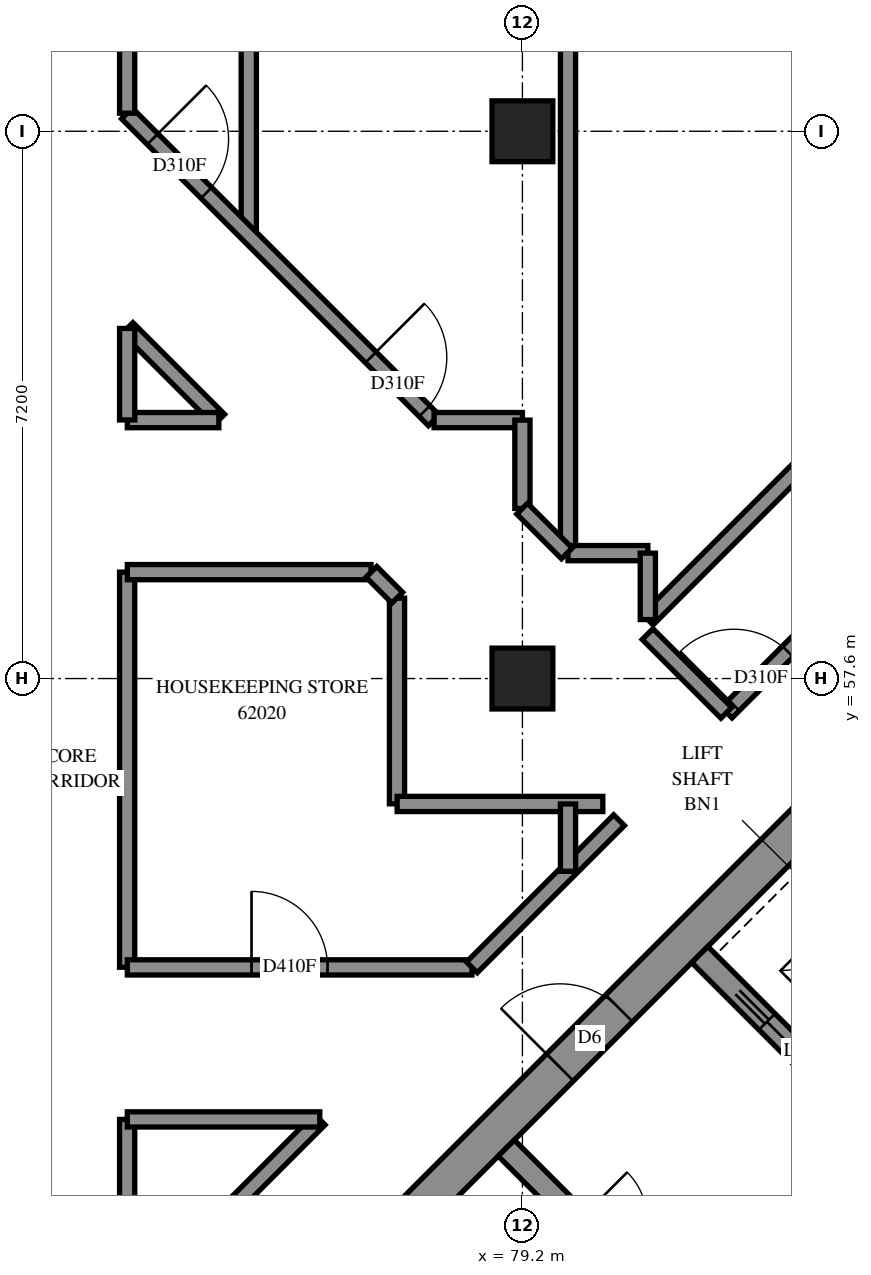
"""IFC4 building model, lengths in metres.
Left out: names, types, materials, properties, quantities, classifications, styles, units other than length and angle.
Written with IfcOpenShell. Run it as: python <this file> out.ifc"""

import sys

from ifc_helpers import new_model, si_unit, direction, frame, frame_2d, origin, origin_2d, place, context, subcontext, project, spatial, rectangle, extrude, element, fill, save


model = new_model("IFC4")
c1 = context("Model", 3, precision=1e-05, world=origin(), true_north=direction((0.0, 1.0)))
c2 = subcontext(c1, "Body", "Model", "MODEL_VIEW")
j1 = project(units=[si_unit("LENGTHUNIT", "METRE"), si_unit("PLANEANGLEUNIT", "RADIAN")], contexts=[c1])
p1 = place(None, origin())
s1 = spatial("IfcSite", under=j1, at=p1, CompositionType="ELEMENT")
p2 = place(p1, origin())
s2 = spatial("IfcBuilding", under=s1, at=p2, CompositionType="ELEMENT")
p3 = place(p2, frame((0.0, 0.0, 227.0)))
s3 = spatial("IfcBuildingStorey", under=s2, at=p3, CompositionType="ELEMENT", Elevation=227.0)
for number, where, z_axis, x_axis in (
    (1, (79.2, 57.6, 0.0), (0.0, 0.0, 1.0), (1.0, 0.0, 0.0)),
    (2, (79.2, 64.8, 0.0), (0.0, 0.0, 1.0), (1.0, 0.0, 0.0)),
):
    element("IfcColumn", number, at=place(p3, frame(where, z_axis=z_axis, x_axis=x_axis)), inside=s3, PredefinedType="COLUMN", context=c2, shape_type="SweptSolid", body=[
        extrude(rectangle(XDim=0.8, YDim=0.8, at=origin_2d()), origin(), (0.0, 0.0, 1.0), 3.1),
    ])
p4 = place(p3, frame((76.478, 49.267, -0.3), z_axis=(0.0, 0.0, 1.0), x_axis=(0.7071067812, 0.7071067812, 0.0)))
e3 = element("IfcWall", 3, at=p4, inside=s3, PredefinedType="SHEAR", context=c2, shape_type="SweptSolid", body=[
    extrude(rectangle(XDim=14.4, YDim=0.5, at=frame_2d((7.2, 0.0))), origin(), (0.0, 0.0, 1.0), 2.7),
])
p5 = place(p4, frame((4.55, 0.0, 0.3)))
e4 = element("IfcOpeningElement", 4, at=p5, cuts=e3, PredefinedType="OPENING", context=c2, shape_type="SweptSolid", body=[
    extrude(rectangle(XDim=1.1, YDim=2.1, at=frame_2d((0.55, 1.05))), frame((0.0, 0.26, 0.0), z_axis=(0.0, -1.0, 0.0), x_axis=(1.0, 0.0, 0.0)), (0.0, 0.0, 1.0), 0.52),
])
p6 = place(p4, frame((11.35, 0.0, 0.3)))
e5 = element("IfcOpeningElement", 5, at=p6, cuts=e3, PredefinedType="OPENING", context=c2, shape_type="SweptSolid", body=[
    extrude(rectangle(XDim=1.1, YDim=2.1, at=frame_2d((0.55, 1.05))), frame((0.0, 0.26, 0.0), z_axis=(0.0, -1.0, 0.0), x_axis=(1.0, 0.0, 0.0)), (0.0, 0.0, 1.0), 0.52),
])
p7 = place(p3, frame((78.988, 51.423, 0.0), z_axis=(0.0, 0.0, 1.0), x_axis=(0.7071067812, -0.7071067812, 0.0)))
e6 = element("IfcWall", 6, at=p7, inside=s3, PredefinedType="SOLIDWALL", context=c2, shape_type="SweptSolid", body=[
    extrude(rectangle(XDim=14.4, YDim=0.3, at=frame_2d((7.2, 0.0))), origin(), (0.0, 0.0, 1.0), 3.1),
])
p8 = place(p7, frame((1.35, 0.0, 0.0)))
e7 = element("IfcOpeningElement", 7, at=p8, cuts=e6, PredefinedType="OPENING", context=c2, shape_type="SweptSolid", body=[
    extrude(rectangle(XDim=0.9, YDim=2.1, at=frame_2d((0.45, 1.05))), frame((0.0, 0.16, 0.0), z_axis=(0.0, -1.0, 0.0), x_axis=(1.0, 0.0, 0.0)), (0.0, 0.0, 1.0), 0.32),
])
p9 = place(p7, frame((4.95, 0.0, 0.0)))
e8 = element("IfcOpeningElement", 8, at=p9, cuts=e6, PredefinedType="OPENING", context=c2, shape_type="SweptSolid", body=[
    extrude(rectangle(XDim=0.9, YDim=2.1, at=frame_2d((0.45, 1.05))), frame((0.0, 0.16, 0.0), z_axis=(0.0, -1.0, 0.0), x_axis=(1.0, 0.0, 0.0)), (0.0, 0.0, 1.0), 0.32),
])
p10 = place(p7, frame((8.55, 0.0, 0.0)))
e9 = element("IfcOpeningElement", 9, at=p10, cuts=e6, PredefinedType="OPENING", context=c2, shape_type="SweptSolid", body=[
    extrude(rectangle(XDim=0.9, YDim=2.1, at=frame_2d((0.45, 1.05))), frame((0.0, 0.16, 0.0), z_axis=(0.0, -1.0, 0.0), x_axis=(1.0, 0.0, 0.0)), (0.0, 0.0, 1.0), 0.32),
])
p11 = place(p7, frame((12.05, 0.0, 0.0)))
e10 = element("IfcOpeningElement", 10, at=p11, cuts=e6, PredefinedType="OPENING", context=c2, shape_type="SweptSolid", body=[
    extrude(rectangle(XDim=1.1, YDim=2.1, at=frame_2d((0.55, 1.05))), frame((0.0, 0.16, 0.0), z_axis=(0.0, -1.0, 0.0), x_axis=(1.0, 0.0, 0.0)), (0.0, 0.0, 1.0), 0.32),
])
p12 = place(p3, frame((81.534, 53.969, 0.0), z_axis=(0.0, 0.0, 1.0), x_axis=(0.707103309, -0.7071102534, 0.0)))
e11 = element("IfcWall", 11, at=p12, inside=s3, PredefinedType="SOLIDWALL", context=c2, shape_type="SweptSolid", body=[
    extrude(rectangle(XDim=14.4, YDim=0.3, at=frame_2d((7.2, 0.0))), origin(), (0.0, 0.0, 1.0), 3.1),
])
p13 = place(p12, frame((1.25, 0.0, 0.0)))
e12 = element("IfcOpeningElement", 12, at=p13, cuts=e11, PredefinedType="OPENING", context=c2, shape_type="SweptSolid", body=[
    extrude(rectangle(XDim=1.1, YDim=2.1, at=frame_2d((0.55, 1.05))), frame((0.0, 0.16, 0.0), z_axis=(0.0, -1.0, 0.0), x_axis=(1.0, 0.0, 0.0)), (0.0, 0.0, 1.0), 0.32),
])
p14 = place(p12, frame((4.85, 0.0, 0.0)))
e13 = element("IfcOpeningElement", 13, at=p14, cuts=e11, PredefinedType="OPENING", context=c2, shape_type="SweptSolid", body=[
    extrude(rectangle(XDim=1.1, YDim=2.1, at=frame_2d((0.55, 1.05))), frame((0.0, 0.16, 0.0), z_axis=(0.0, -1.0, 0.0), x_axis=(1.0, 0.0, 0.0)), (0.0, 0.0, 1.0), 0.32),
])
p15 = place(p12, frame((8.45, 0.0, 0.0)))
e14 = element("IfcOpeningElement", 14, at=p15, cuts=e11, PredefinedType="OPENING", context=c2, shape_type="SweptSolid", body=[
    extrude(rectangle(XDim=1.1, YDim=2.1, at=frame_2d((0.55, 1.05))), frame((0.0, 0.16, 0.0), z_axis=(0.0, -1.0, 0.0), x_axis=(1.0, 0.0, 0.0)), (0.0, 0.0, 1.0), 0.32),
])
p16 = place(p12, frame((12.05, 0.0, 0.0)))
e15 = element("IfcOpeningElement", 15, at=p16, cuts=e11, PredefinedType="OPENING", context=c2, shape_type="SweptSolid", body=[
    extrude(rectangle(XDim=1.1, YDim=2.1, at=frame_2d((0.55, 1.05))), frame((0.0, 0.16, 0.0), z_axis=(0.0, -1.0, 0.0), x_axis=(1.0, 0.0, 0.0)), (0.0, 0.0, 1.0), 0.32),
])
p17 = place(p3, frame((79.8, 59.25, 0.0), z_axis=(0.0, 0.0, 1.0), x_axis=(0.0, 1.0, 0.0)))
e16 = element("IfcWall", 16, at=p17, inside=s3, PredefinedType="PARTITIONING", context=c2, shape_type="SweptSolid", body=[
    extrude(rectangle(XDim=14.528, YDim=0.2, at=frame_2d((7.264, 0.0))), origin(), (0.0, 0.0, 1.0), 3.1),
])
p18 = place(p3, frame((80.849, 58.377, 0.0), z_axis=(0.0, 0.0, 1.0), x_axis=(0.7071120471, 0.7071015152, 0.0)))
e17 = element("IfcWall", 17, at=p18, inside=s3, PredefinedType="PARTITIONING", context=c2, shape_type="SweptSolid", body=[
    extrude(rectangle(XDim=9.495, YDim=0.2, at=frame_2d((4.747, 0.0))), origin(), (0.0, 0.0, 1.0), 3.1),
])
p19 = place(p3, frame((75.6, 63.438, 0.0), z_axis=(0.0, 0.0, 1.0), x_axis=(0.0, 1.0, 0.0)))
e18 = element("IfcWall", 18, at=p19, inside=s3, PredefinedType="PARTITIONING", context=c2, shape_type="SweptSolid", body=[
    extrude(rectangle(XDim=9.38, YDim=0.2, at=frame_2d((4.69, 0.0))), origin(), (0.0, 0.0, 1.0), 3.1),
])
p20 = place(p3, frame((81.887, 57.153, 0.0), z_axis=(0.0, 0.0, 1.0), x_axis=(0.7071067812, 0.7071067812, 0.0)))
e19 = element("IfcWall", 19, at=p20, inside=s3, PredefinedType="PARTITIONING", context=c2, shape_type="SweptSolid", body=[
    extrude(rectangle(XDim=6.997, YDim=0.2, at=frame_2d((3.499, 0.0))), origin(), (0.0, 0.0, 1.0), 3.1),
])
p21 = place(p20, frame((0.136, 0.0, 0.0)))
e20 = element("IfcOpeningElement", 20, at=p21, cuts=e19, PredefinedType="OPENING", context=c2, shape_type="SweptSolid", body=[
    extrude(rectangle(XDim=1.0, YDim=2.1, at=frame_2d((0.5, 1.05))), frame((0.0, 0.11, 0.0), z_axis=(0.0, -1.0, 0.0), x_axis=(1.0, 0.0, 0.0)), (0.0, 0.0, 1.0), 0.22),
])
p22 = place(p3, frame((73.997, 65.035, 0.0), z_axis=(0.0, 0.0, 1.0), x_axis=(0.7071067812, -0.7071067812, 0.0)))
e21 = element("IfcWall", 21, at=p22, inside=s3, PredefinedType="PARTITIONING", context=c2, shape_type="SweptSolid", body=[
    extrude(rectangle(XDim=5.711, YDim=0.2, at=frame_2d((2.855, 0.0))), origin(), (0.0, 0.0, 1.0), 3.1),
])
p23 = place(p22, frame((0.478, 0.0, 0.0)))
e22 = element("IfcOpeningElement", 22, at=p23, cuts=e21, PredefinedType="OPENING", context=c2, shape_type="SweptSolid", body=[
    extrude(rectangle(XDim=1.0, YDim=2.1, at=frame_2d((0.5, 1.05))), frame((0.0, 0.11, 0.0), z_axis=(0.0, -1.0, 0.0), x_axis=(1.0, 0.0, 0.0)), (0.0, 0.0, 1.0), 0.22),
])
p24 = place(p22, frame((4.538, 0.0, 0.0)))
e23 = element("IfcOpeningElement", 23, at=p24, cuts=e21, PredefinedType="OPENING", context=c2, shape_type="SweptSolid", body=[
    extrude(rectangle(XDim=1.0, YDim=2.1, at=frame_2d((0.5, 1.05))), frame((0.0, 0.11, 0.0), z_axis=(0.0, -1.0, 0.0), x_axis=(1.0, 0.0, 0.0)), (0.0, 0.0, 1.0), 0.22),
])
p25 = place(p3, frame((74.0, 53.802, 0.0), z_axis=(0.0, 0.0, 1.0), x_axis=(0.0, 1.0, 0.0)))
e24 = element("IfcWall", 24, at=p25, inside=s3, PredefinedType="PARTITIONING", context=c2, shape_type="SweptSolid", body=[
    extrude(rectangle(XDim=5.198, YDim=0.2, at=frame_2d((2.599, 0.0))), origin(), (0.0, 0.0, 1.0), 3.1),
])
p26 = place(p3, frame((74.002, 53.8, 0.0), z_axis=(0.0, 0.0, 1.0), x_axis=(1.0, 0.0, 0.0)))
e25 = element("IfcWall", 25, at=p26, inside=s3, PredefinedType="PARTITIONING", context=c2, shape_type="SweptSolid", body=[
    extrude(rectangle(XDim=4.534, YDim=0.2, at=frame_2d((2.267, 0.0))), origin(), (0.0, 0.0, 1.0), 3.1),
])
p27 = place(p26, frame((1.634, 0.0, 0.0)))
e26 = element("IfcOpeningElement", 26, at=p27, cuts=e25, PredefinedType="OPENING", context=c2, shape_type="SweptSolid", body=[
    extrude(rectangle(XDim=1.0, YDim=2.1, at=frame_2d((0.5, 1.05))), frame((0.0, 0.11, 0.0), z_axis=(0.0, -1.0, 0.0), x_axis=(1.0, 0.0, 0.0)), (0.0, 0.0, 1.0), 0.22),
])
p28 = place(p3, frame((74.001, 49.267, 0.0), z_axis=(0.0, 0.0, 1.0), x_axis=(0.7071067812, 0.7071067812, 0.0)))
e27 = element("IfcWall", 27, at=p28, inside=s3, PredefinedType="PARTITIONING", context=c2, shape_type="SweptSolid", body=[
    extrude(rectangle(XDim=3.581, YDim=0.2, at=frame_2d((1.79, 0.0))), origin(), (0.0, 0.0, 1.0), 3.1),
])
p29 = place(p3, frame((74.002, 59.0, 0.0), z_axis=(0.0, 0.0, 1.0), x_axis=(1.0, 0.0, 0.0)))
e28 = element("IfcWall", 28, at=p29, inside=s3, PredefinedType="PARTITIONING", context=c2, shape_type="SweptSolid", body=[
    extrude(rectangle(XDim=3.206, YDim=0.2, at=frame_2d((1.603, 0.0))), origin(), (0.0, 0.0, 1.0), 3.1),
])
p30 = place(p3, frame((78.535, 53.801, 0.0), z_axis=(0.0, 0.0, 1.0), x_axis=(0.7071067812, 0.7071067812, 0.0)))
e29 = element("IfcWall", 29, at=p30, inside=s3, PredefinedType="PARTITIONING", context=c2, shape_type="SweptSolid", body=[
    extrude(rectangle(XDim=2.738, YDim=0.2, at=frame_2d((1.369, 0.0))), origin(), (0.0, 0.0, 1.0), 3.1),
])
for number, where, z_axis, x_axis in (
    (30, (77.55, 55.952, 0.0), (0.0, 0.0, 1.0), (0.0, 1.0, 0.0)),
    (31, (77.552, 55.95, 0.0), (0.0, 0.0, 1.0), (1.0, 0.0, 0.0)),
):
    element("IfcWall", number, at=place(p3, frame(where, z_axis=z_axis, x_axis=x_axis)), inside=s3, PredefinedType="PARTITIONING", context=c2, shape_type="SweptSolid", body=[
        extrude(rectangle(XDim=2.706, YDim=0.2, at=frame_2d((1.353, 0.0))), origin(), (0.0, 0.0, 1.0), 3.1),
    ])
p31 = place(p3, frame((74.0, 49.266, 0.0), z_axis=(0.0, 0.0, 1.0), x_axis=(0.0, 1.0, 0.0)))
e32 = element("IfcWall", 32, at=p31, inside=s3, PredefinedType="PARTITIONING", context=c2, shape_type="SweptSolid", body=[
    extrude(rectangle(XDim=2.534, YDim=0.2, at=frame_2d((1.267, 0.0))), origin(), (0.0, 0.0, 1.0), 3.1),
])
p32 = place(p3, frame((74.002, 51.8, 0.0), z_axis=(0.0, 0.0, 1.0), x_axis=(1.0, 0.0, 0.0)))
e33 = element("IfcWall", 33, at=p32, inside=s3, PredefinedType="PARTITIONING", context=c2, shape_type="SweptSolid", body=[
    extrude(rectangle(XDim=2.532, YDim=0.2, at=frame_2d((1.266, 0.0))), origin(), (0.0, 0.0, 1.0), 3.1),
])
p33 = place(p3, frame((74.0, 65.038, 0.0), z_axis=(0.0, 0.0, 1.0), x_axis=(0.0, 1.0, 0.0)))
e34 = element("IfcWall", 34, at=p33, inside=s3, PredefinedType="PARTITIONING", context=c2, shape_type="SweptSolid", body=[
    extrude(rectangle(XDim=1.762, YDim=0.2, at=frame_2d((0.881, 0.0))), origin(), (0.0, 0.0, 1.0), 3.1),
])
p34 = place(p3, frame((74.005, 62.212, 0.0), z_axis=(0.0, 0.0, 1.0), x_axis=(0.7071067812, -0.7071067812, 0.0)))
e35 = element("IfcWall", 35, at=p34, inside=s3, PredefinedType="PARTITIONING", context=c2, shape_type="SweptSolid", body=[
    extrude(rectangle(XDim=1.706, YDim=0.2, at=frame_2d((0.853, 0.0))), origin(), (0.0, 0.0, 1.0), 3.1),
])
p35 = place(p3, frame((80.847, 58.185, 0.0), z_axis=(0.0, 0.0, 1.0), x_axis=(0.7071067812, -0.7071067812, 0.0)))
e36 = element("IfcWall", 36, at=p35, inside=s3, PredefinedType="PARTITIONING", context=c2, shape_type="SweptSolid", body=[
    extrude(rectangle(XDim=1.465, YDim=0.2, at=frame_2d((0.733, 0.0))), origin(), (0.0, 0.0, 1.0), 3.1),
])
for number, where, z_axis, x_axis in (
    (37, (74.002, 61.0, 0.0), (0.0, 0.0, 1.0), (1.0, 0.0, 0.0)),
    (38, (74.0, 61.002, 0.0), (0.0, 0.0, 1.0), (0.0, 1.0, 0.0)),
):
    element("IfcWall", number, at=place(p3, frame(where, z_axis=z_axis, x_axis=x_axis)), inside=s3, PredefinedType="PARTITIONING", context=c2, shape_type="SweptSolid", body=[
        extrude(rectangle(XDim=1.204, YDim=0.2, at=frame_2d((0.602, 0.0))), origin(), (0.0, 0.0, 1.0), 3.1),
    ])
for number, where, z_axis, x_axis in (
    (39, (78.038, 61.0, 0.0), (0.0, 0.0, 1.0), (1.0, 0.0, 0.0)),
    (40, (79.2, 59.838, 0.0), (0.0, 0.0, 1.0), (0.0, 1.0, 0.0)),
):
    element("IfcWall", number, at=place(p3, frame(where, z_axis=z_axis, x_axis=x_axis)), inside=s3, PredefinedType="PARTITIONING", context=c2, shape_type="SweptSolid", body=[
        extrude(rectangle(XDim=1.162, YDim=0.2, at=frame_2d((0.581, 0.0))), origin(), (0.0, 0.0, 1.0), 3.1),
    ])
p36 = place(p3, frame((79.8, 59.25, 0.0), z_axis=(0.0, 0.0, 1.0), x_axis=(1.0, 0.0, 0.0)))
e41 = element("IfcWall", 41, at=p36, inside=s3, PredefinedType="PARTITIONING", context=c2, shape_type="SweptSolid", body=[
    extrude(rectangle(XDim=1.05, YDim=0.2, at=frame_2d((0.525, 0.0))), origin(), (0.0, 0.0, 1.0), 3.1),
])
p37 = place(p3, frame((79.8, 55.064, 0.0), z_axis=(0.0, 0.0, 1.0), x_axis=(0.0, 1.0, 0.0)))
e42 = element("IfcWall", 42, at=p37, inside=s3, PredefinedType="PARTITIONING", context=c2, shape_type="SweptSolid", body=[
    extrude(rectangle(XDim=0.886, YDim=0.2, at=frame_2d((0.443, 0.0))), origin(), (0.0, 0.0, 1.0), 3.1),
])
p38 = place(p3, frame((80.85, 58.376, 0.0), z_axis=(0.0, 0.0, 1.0), x_axis=(0.0, 1.0, 0.0)))
e43 = element("IfcWall", 43, at=p38, inside=s3, PredefinedType="PARTITIONING", context=c2, shape_type="SweptSolid", body=[
    extrude(rectangle(XDim=0.874, YDim=0.2, at=frame_2d((0.437, 0.0))), origin(), (0.0, 0.0, 1.0), 3.1),
])
p39 = place(p3, frame((79.197, 59.835, 0.0), z_axis=(0.0, 0.0, 1.0), x_axis=(0.7071067812, -0.7071067812, 0.0)))
e44 = element("IfcWall", 44, at=p39, inside=s3, PredefinedType="PARTITIONING", context=c2, shape_type="SweptSolid", body=[
    extrude(rectangle(XDim=0.832, YDim=0.2, at=frame_2d((0.416, 0.0))), origin(), (0.0, 0.0, 1.0), 3.1),
])
p40 = place(p3, frame((77.213, 59.004, 0.0), z_axis=(0.0, 0.0, 1.0), x_axis=(0.7071067812, -0.7071067812, 0.0)))
e45 = element("IfcWall", 45, at=p40, inside=s3, PredefinedType="PARTITIONING", context=c2, shape_type="SweptSolid", body=[
    extrude(rectangle(XDim=0.481, YDim=0.2, at=frame_2d((0.24, 0.0))), origin(), (0.0, 0.0, 1.0), 3.1),
])
p41 = place(p5, origin())
e46 = element("IfcDoor", 46, at=p41, inside=s3, OperationType="DOUBLE_DOOR_SINGLE_SWING", PredefinedType="DOOR", context=c2, shape_type="SweptSolid", body=[
    extrude(rectangle(XDim=1.1, YDim=2.1, at=frame_2d((0.55, 1.05))), frame((0.0, 0.025, 0.0), z_axis=(0.0, -1.0, 0.0), x_axis=(1.0, 0.0, 0.0)), (0.0, 0.0, 1.0), 0.05),
])
fill(e4, e46)
p42 = place(p13, origin())
e47 = element("IfcDoor", 47, at=p42, inside=s3, OperationType="SLIDING_TO_LEFT", PredefinedType="DOOR", context=c2, shape_type="SweptSolid", body=[
    extrude(rectangle(XDim=1.1, YDim=2.1, at=frame_2d((0.55, 1.05))), frame((0.0, 0.025, 0.0), z_axis=(0.0, -1.0, 0.0), x_axis=(1.0, 0.0, 0.0)), (0.0, 0.0, 1.0), 0.05),
])
fill(e12, e47)
p43 = place(p27, origin())
e48 = element("IfcDoor", 48, at=p43, inside=s3, OperationType="SINGLE_SWING_LEFT", PredefinedType="DOOR", context=c2, shape_type="SweptSolid", body=[
    extrude(rectangle(XDim=1.0, YDim=2.1, at=frame_2d((0.5, 1.05))), frame((0.0, 0.025, 0.0), z_axis=(0.0, -1.0, 0.0), x_axis=(1.0, 0.0, 0.0)), (0.0, 0.0, 1.0), 0.05),
])
fill(e26, e48)
p44 = place(p23, origin())
e49 = element("IfcDoor", 49, at=p44, inside=s3, OperationType="SINGLE_SWING_RIGHT", PredefinedType="DOOR", context=c2, shape_type="SweptSolid", body=[
    extrude(rectangle(XDim=1.0, YDim=2.1, at=frame_2d((0.5, 1.05))), frame((0.0, 0.025, 0.0), z_axis=(0.0, -1.0, 0.0), x_axis=(1.0, 0.0, 0.0)), (0.0, 0.0, 1.0), 0.05),
])
fill(e22, e49)
p45 = place(p24, origin())
e50 = element("IfcDoor", 50, at=p45, inside=s3, OperationType="SINGLE_SWING_LEFT", PredefinedType="DOOR", context=c2, shape_type="SweptSolid", body=[
    extrude(rectangle(XDim=1.0, YDim=2.1, at=frame_2d((0.5, 1.05))), frame((0.0, 0.025, 0.0), z_axis=(0.0, -1.0, 0.0), x_axis=(1.0, 0.0, 0.0)), (0.0, 0.0, 1.0), 0.05),
])
fill(e23, e50)
p46 = place(p21, origin())
e51 = element("IfcDoor", 51, at=p46, inside=s3, OperationType="SINGLE_SWING_RIGHT", PredefinedType="DOOR", context=c2, shape_type="SweptSolid", body=[
    extrude(rectangle(XDim=1.0, YDim=2.1, at=frame_2d((0.5, 1.05))), frame((0.0, 0.025, 0.0), z_axis=(0.0, -1.0, 0.0), x_axis=(1.0, 0.0, 0.0)), (0.0, 0.0, 1.0), 0.05),
])
fill(e20, e51)
save(model, sys.argv[1])
